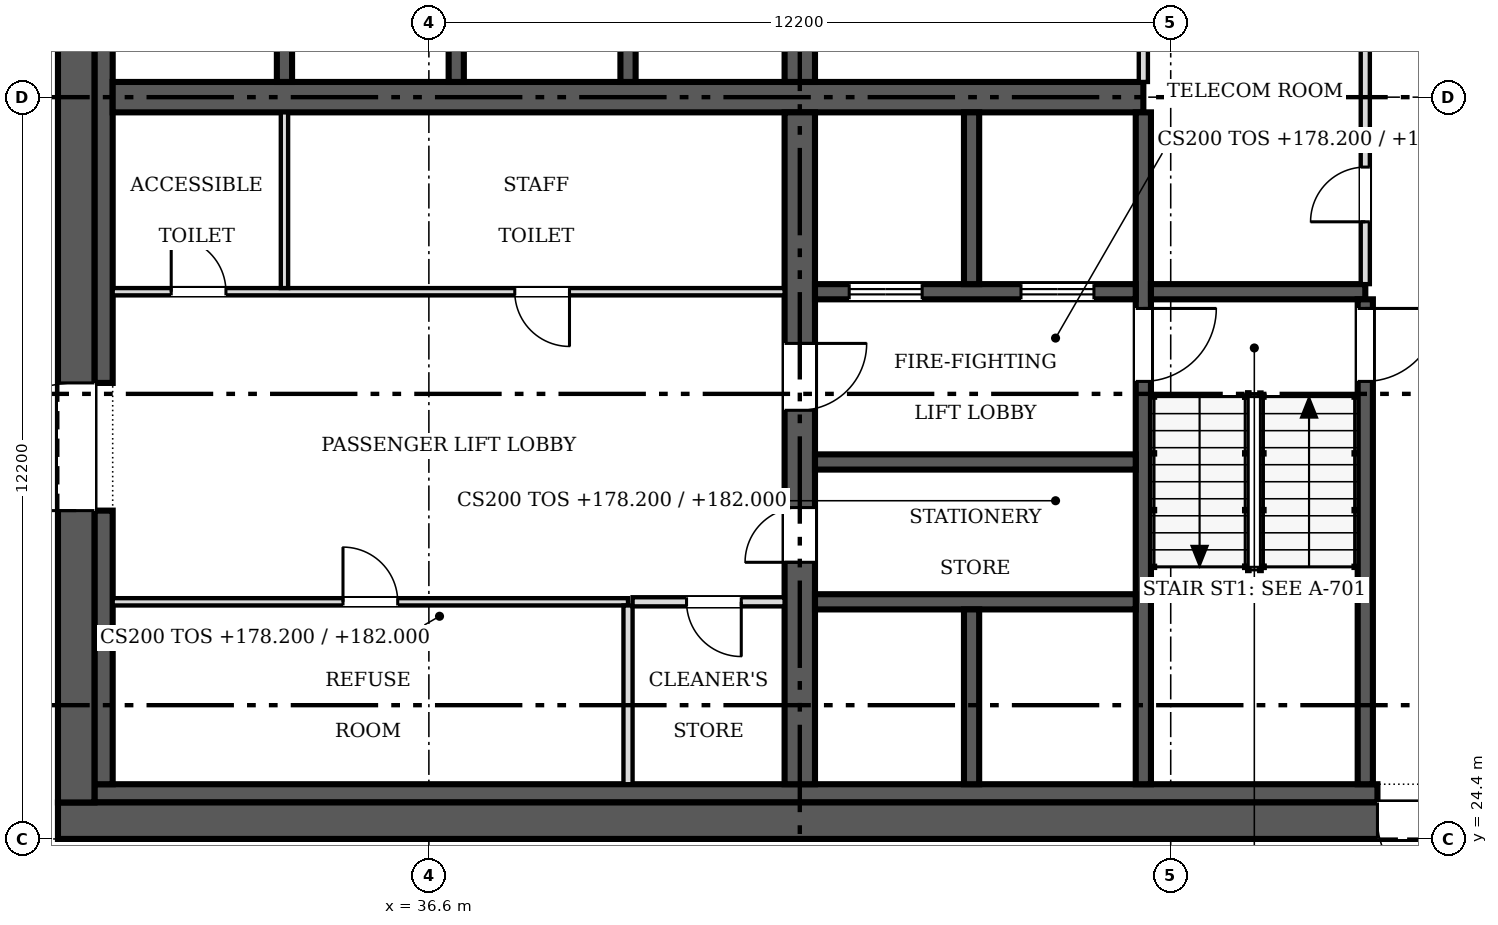
"""IFC4 building model, lengths in metres.
Left out: names, types, materials, properties, quantities, classifications, styles, units other than length and angle.
Written with IfcOpenShell. Run it as: python <this file> out.ifc"""

import sys

from ifc_helpers import new_model, si_unit, direction, frame, frame_2d, origin, place, context, subcontext, project, spatial, rectangle, extrude, source, transform, mapped, element, fill, save


model = new_model("IFC4")
c1 = context("Model", 3, precision=1e-05, world=origin(), true_north=direction((0.0, 1.0)))
c2 = subcontext(c1, "Body", "Model", "MODEL_VIEW")
j1 = project(units=[si_unit("LENGTHUNIT", "METRE"), si_unit("PLANEANGLEUNIT", "RADIAN")], contexts=[c1])
p1 = place(None, origin())
s1 = spatial("IfcSite", under=j1, at=p1, CompositionType="ELEMENT")
p2 = place(p1, origin())
s2 = spatial("IfcBuilding", under=s1, at=p2, CompositionType="ELEMENT")
p3 = place(p2, frame((0.0, 0.0, 178.2)))
s3 = spatial("IfcBuildingStorey", under=s2, at=p3, CompositionType="ELEMENT", Elevation=178.2)
p4 = place(p3, frame((54.9, 24.7, 0.0), z_axis=(0.0, 0.0, 1.0), x_axis=(-1.0, 0.0, 0.0)))
e1 = element("IfcWall", 1, at=p4, inside=s3, PredefinedType="SHEAR", context=c2, shape_type="SweptSolid", body=[
    extrude(rectangle(XDim=24.4, YDim=0.6, at=frame_2d((12.2, 0.0))), origin(), (0.0, 0.0, 1.0), 3.8),
])
m1 = source(origin(), c2, "Body", "SweptSolid", [
    extrude(rectangle(XDim=1.2, YDim=2.1, at=frame_2d((0.6, 1.05))), frame((0.0, 0.31, 0.0), z_axis=(0.0, -1.0, 0.0), x_axis=(1.0, 0.0, 0.0)), (0.0, 0.0, 1.0), 0.62),
])
p5 = place(p4, frame((1.5, 0.0, 0.0)))
e2 = element("IfcOpeningElement", 2, at=p5, cuts=e1, PredefinedType="OPENING", context=c2, shape_type="MappedRepresentation", body=[
    mapped(m1, transform((0.0, 0.0, 0.0), scale=1.0)),
])
p6 = place(p3, frame((30.8, 25.0, 0.0), z_axis=(0.0, 0.0, 1.0), x_axis=(0.0, 1.0, 0.0)))
e3 = element("IfcWall", 3, at=p6, inside=s3, PredefinedType="SHEAR", context=c2, shape_type="SweptSolid", body=[
    extrude(rectangle(XDim=23.2, YDim=0.6, at=frame_2d((11.6, 0.0))), origin(), (0.0, 0.0, 1.0), 3.8),
])
m2 = source(origin(), c2, "Body", "SweptSolid", [
    extrude(rectangle(XDim=2.1, YDim=2.4, at=frame_2d((1.05, 1.2))), frame((0.0, 0.31, 0.0), z_axis=(0.0, -1.0, 0.0), x_axis=(1.0, 0.0, 0.0)), (0.0, 0.0, 1.0), 0.62),
])
p7 = place(p6, frame((4.8, 0.0, 0.0)))
e4 = element("IfcOpeningElement", 4, at=p7, cuts=e3, PredefinedType="OPENING", context=c2, shape_type="MappedRepresentation", body=[
    mapped(m2, transform((0.0, 0.0, 0.0), scale=1.0)),
])
p8 = place(p6, frame((16.3, 0.0, 0.0)))
e5 = element("IfcOpeningElement", 5, at=p8, cuts=e3, PredefinedType="OPENING", context=c2, shape_type="MappedRepresentation", body=[
    mapped(m2, transform((0.0, 0.0, 0.0), scale=1.0)),
])
p9 = place(p3, frame((31.1, 25.15, 0.0), z_axis=(0.0, 0.0, 1.0), x_axis=(1.0, 0.0, 0.0)))
e6 = element("IfcWall", 6, at=p9, inside=s3, PredefinedType="SOLIDWALL", context=c2, shape_type="SweptSolid", body=[
    extrude(rectangle(XDim=21.1, YDim=0.3, at=frame_2d((10.55, 0.0))), origin(), (0.0, 0.0, 1.0), 3.8),
])
p10 = place(p3, frame((31.25, 25.3, 0.0), z_axis=(0.0, 0.0, 1.0), x_axis=(0.0, 1.0, 0.0)))
e7 = element("IfcWall", 7, at=p10, inside=s3, PredefinedType="SOLIDWALL", context=c2, shape_type="SweptSolid", body=[
    extrude(rectangle(XDim=4.5, YDim=0.3, at=frame_2d((2.25, 0.0))), origin(), (0.0, 0.0, 1.0), 3.8),
])
p11 = place(p3, frame((31.25, 31.9, 0.0), z_axis=(0.0, 0.0, 1.0), x_axis=(0.0, 1.0, 0.0)))
e8 = element("IfcWall", 8, at=p11, inside=s3, PredefinedType="SOLIDWALL", context=c2, shape_type="SweptSolid", body=[
    extrude(rectangle(XDim=9.4, YDim=0.3, at=frame_2d((4.7, 0.0))), origin(), (0.0, 0.0, 1.0), 3.8),
])
p12 = place(p3, frame((31.4, 36.6, 0.0), z_axis=(0.0, 0.0, 1.0), x_axis=(1.0, 0.0, 0.0)))
e9 = element("IfcWall", 9, at=p12, inside=s3, PredefinedType="SHEAR", context=c2, shape_type="SweptSolid", body=[
    extrude(rectangle(XDim=16.95, YDim=0.5, at=frame_2d((8.475, 0.0))), origin(), (0.0, 0.0, 1.0), 3.8),
])
p13 = place(p3, frame((42.7, 36.35, 0.0), z_axis=(0.0, 0.0, 1.0), x_axis=(0.0, -1.0, 0.0)))
e10 = element("IfcWall", 10, at=p13, inside=s3, PredefinedType="SHEAR", context=c2, shape_type="SweptSolid", body=[
    extrude(rectangle(XDim=11.05, YDim=0.5, at=frame_2d((5.525, 0.0))), origin(), (0.0, 0.0, 1.0), 3.8),
])
m3 = source(origin(), c2, "Body", "SweptSolid", [
    extrude(rectangle(XDim=0.9, YDim=2.1, at=frame_2d((0.45, 1.05))), frame((0.0, 0.26, 0.0), z_axis=(0.0, -1.0, 0.0), x_axis=(1.0, 0.0, 0.0)), (0.0, 0.0, 1.0), 0.52),
])
p14 = place(p13, frame((6.5, 0.0, 0.0)))
e11 = element("IfcOpeningElement", 11, at=p14, cuts=e10, PredefinedType="OPENING", context=c2, shape_type="MappedRepresentation", body=[
    mapped(m3, transform((0.0, 0.0, 0.0), scale=1.0)),
])
m4 = source(origin(), c2, "Body", "SweptSolid", [
    extrude(rectangle(XDim=1.1, YDim=2.1, at=frame_2d((0.55, 1.05))), frame((0.0, 0.26, 0.0), z_axis=(0.0, -1.0, 0.0), x_axis=(1.0, 0.0, 0.0)), (0.0, 0.0, 1.0), 0.52),
])
p15 = place(p13, frame((3.8, 0.0, 0.0)))
e12 = element("IfcOpeningElement", 12, at=p15, cuts=e10, PredefinedType="OPENING", context=c2, shape_type="MappedRepresentation", body=[
    mapped(m4, transform((0.0, 0.0, 0.0), scale=1.0)),
])
p16 = place(p3, frame((42.7, 36.85, 0.0), z_axis=(0.0, 0.0, 1.0), x_axis=(0.0, 1.0, 0.0)))
e13 = element("IfcWall", 13, at=p16, inside=s3, PredefinedType="SHEAR", context=c2, shape_type="SweptSolid", body=[
    extrude(rectangle(XDim=2.95, YDim=0.5, at=frame_2d((1.475, 0.0))), origin(), (0.0, 0.0, 1.0), 3.8),
])
p17 = place(p3, frame((48.35, 36.35, 0.0), z_axis=(0.0, 0.0, 1.0), x_axis=(0.0, -1.0, 0.0)))
e14 = element("IfcWall", 14, at=p17, inside=s3, PredefinedType="SOLIDWALL", context=c2, shape_type="SweptSolid", body=[
    extrude(rectangle(XDim=11.05, YDim=0.25, at=frame_2d((5.525, 0.0))), origin(), (0.0, 0.0, 1.0), 3.8),
])
m5 = source(origin(), c2, "Body", "SweptSolid", [
    extrude(rectangle(XDim=1.2, YDim=2.1, at=frame_2d((0.6, 1.05))), frame((0.0, 0.135, 0.0), z_axis=(0.0, -1.0, 0.0), x_axis=(1.0, 0.0, 0.0)), (0.0, 0.0, 1.0), 0.27),
])
p18 = place(p17, frame((3.225, 0.0, 0.0)))
e15 = element("IfcOpeningElement", 15, at=p18, cuts=e14, PredefinedType="OPENING", context=c2, shape_type="MappedRepresentation", body=[
    mapped(m5, transform((0.0, 0.0, 0.0), scale=1.0)),
])
p19 = place(p3, frame((48.225, 33.4, 0.0), z_axis=(0.0, 0.0, 1.0), x_axis=(-1.0, 0.0, 0.0)))
e16 = element("IfcWall", 16, at=p19, inside=s3, PredefinedType="SOLIDWALL", context=c2, shape_type="SweptSolid", body=[
    extrude(rectangle(XDim=5.275, YDim=0.25, at=frame_2d((2.638, 0.0))), origin(), (0.0, 0.0, 1.0), 3.8),
])
p20 = place(p19, frame((3.512, 0.0, 0.0)))
e17 = element("IfcOpeningElement", 17, at=p20, cuts=e16, PredefinedType="OPENING", context=c2, shape_type="MappedRepresentation", body=[
    mapped(m5, transform((0.0, 0.0, 0.0), scale=1.0)),
])
p21 = place(p19, frame((0.688, 0.0, 0.0)))
e18 = element("IfcOpeningElement", 18, at=p21, cuts=e16, PredefinedType="OPENING", context=c2, shape_type="MappedRepresentation", body=[
    mapped(m5, transform((0.0, 0.0, 0.0), scale=1.0)),
])
p22 = place(p3, frame((48.475, 33.4, 0.0), z_axis=(0.0, 0.0, 1.0), x_axis=(1.0, 0.0, 0.0)))
e19 = element("IfcWall", 19, at=p22, inside=s3, PredefinedType="SOLIDWALL", context=c2, shape_type="SweptSolid", body=[
    extrude(rectangle(XDim=3.525, YDim=0.25, at=frame_2d((1.762, 0.0))), origin(), (0.0, 0.0, 1.0), 3.8),
])
p23 = place(p3, frame((52.0, 25.3, 0.0), z_axis=(0.0, 0.0, 1.0), x_axis=(0.0, 1.0, 0.0)))
e20 = element("IfcWall", 20, at=p23, inside=s3, PredefinedType="SOLIDWALL", context=c2, shape_type="SweptSolid", body=[
    extrude(rectangle(XDim=7.975, YDim=0.25, at=frame_2d((3.987, 0.0))), origin(), (0.0, 0.0, 1.0), 3.8),
])
p24 = place(p23, frame((6.625, 0.0, 0.0)))
e21 = element("IfcOpeningElement", 21, at=p24, cuts=e20, PredefinedType="OPENING", context=c2, shape_type="MappedRepresentation", body=[
    mapped(m5, transform((0.0, 0.0, 0.0), scale=1.0)),
])
for number, where, z_axis, x_axis in (
    (22, (42.95, 28.3, 0.0), (0.0, 0.0, 1.0), (1.0, 0.0, 0.0)),
    (23, (42.95, 30.6, 0.0), (0.0, 0.0, 1.0), (1.0, 0.0, 0.0)),
):
    element("IfcWall", number, at=place(p3, frame(where, z_axis=z_axis, x_axis=x_axis)), inside=s3, PredefinedType="SOLIDWALL", context=c2, shape_type="SweptSolid", body=[
        extrude(rectangle(XDim=5.275, YDim=0.25, at=frame_2d((2.638, 0.0))), origin(), (0.0, 0.0, 1.0), 3.8),
    ])
for number, where, z_axis, x_axis in (
    (24, (34.225, 36.85, 0.0), (0.0, 0.0, 1.0), (0.0, 1.0, 0.0)),
    (25, (37.05, 36.85, 0.0), (0.0, 0.0, 1.0), (0.0, 1.0, 0.0)),
    (26, (39.875, 36.85, 0.0), (0.0, 0.0, 1.0), (0.0, 1.0, 0.0)),
):
    element("IfcWall", number, at=place(p3, frame(where, z_axis=z_axis, x_axis=x_axis)), inside=s3, PredefinedType="SOLIDWALL", context=c2, shape_type="SweptSolid", body=[
        extrude(rectangle(XDim=2.825, YDim=0.25, at=frame_2d((1.413, 0.0))), origin(), (0.0, 0.0, 1.0), 3.8),
    ])
p25 = place(p3, frame((45.525, 33.525, 0.0), z_axis=(0.0, 0.0, 1.0), x_axis=(0.0, 1.0, 0.0)))
e27 = element("IfcWall", 27, at=p25, inside=s3, PredefinedType="SOLIDWALL", context=c2, shape_type="SweptSolid", body=[
    extrude(rectangle(XDim=2.825, YDim=0.25, at=frame_2d((1.413, 0.0))), origin(), (0.0, 0.0, 1.0), 3.8),
])
p26 = place(p3, frame((45.525, 25.3, 0.0), z_axis=(0.0, 0.0, 1.0), x_axis=(0.0, 1.0, 0.0)))
e28 = element("IfcWall", 28, at=p26, inside=s3, PredefinedType="SOLIDWALL", context=c2, shape_type="SweptSolid", body=[
    extrude(rectangle(XDim=2.875, YDim=0.25, at=frame_2d((1.438, 0.0))), origin(), (0.0, 0.0, 1.0), 3.8),
])
p27 = place(p3, frame((31.4, 33.4, 0.0), z_axis=(0.0, 0.0, 1.0), x_axis=(1.0, 0.0, 0.0)))
e29 = element("IfcWall", 29, at=p27, inside=s3, PredefinedType="PARTITIONING", context=c2, shape_type="SweptSolid", body=[
    extrude(rectangle(XDim=11.05, YDim=0.12, at=frame_2d((5.525, 0.0))), origin(), (0.0, 0.0, 1.0), 3.6),
])
m6 = source(origin(), c2, "Body", "SweptSolid", [
    extrude(rectangle(XDim=0.9, YDim=2.1, at=frame_2d((0.45, 1.05))), frame((0.0, 0.07, 0.0), z_axis=(0.0, -1.0, 0.0), x_axis=(1.0, 0.0, 0.0)), (0.0, 0.0, 1.0), 0.14),
])
p28 = place(p27, frame((0.962, 0.0, 0.0)))
e30 = element("IfcOpeningElement", 30, at=p28, cuts=e29, PredefinedType="OPENING", context=c2, shape_type="MappedRepresentation", body=[
    mapped(m6, transform((0.0, 0.0, 0.0), scale=1.0)),
])
p29 = place(p27, frame((6.613, 0.0, 0.0)))
e31 = element("IfcOpeningElement", 31, at=p29, cuts=e29, PredefinedType="OPENING", context=c2, shape_type="MappedRepresentation", body=[
    mapped(m6, transform((0.0, 0.0, 0.0), scale=1.0)),
])
p30 = place(p3, frame((39.875, 28.3, 0.0), z_axis=(0.0, 0.0, 1.0), x_axis=(-1.0, 0.0, 0.0)))
e32 = element("IfcWall", 32, at=p30, inside=s3, PredefinedType="PARTITIONING", context=c2, shape_type="SweptSolid", body=[
    extrude(rectangle(XDim=8.475, YDim=0.12, at=frame_2d((4.238, 0.0))), origin(), (0.0, 0.0, 1.0), 3.6),
])
p31 = place(p30, frame((3.788, 0.0, 0.0)))
e33 = element("IfcOpeningElement", 33, at=p31, cuts=e32, PredefinedType="OPENING", context=c2, shape_type="MappedRepresentation", body=[
    mapped(m6, transform((0.0, 0.0, 0.0), scale=1.0)),
])
p32 = place(p3, frame((52.0, 33.525, 0.0), z_axis=(0.0, 0.0, 1.0), x_axis=(0.0, 1.0, 0.0)))
e34 = element("IfcWall", 34, at=p32, inside=s3, PredefinedType="PARTITIONING", context=c2, shape_type="SweptSolid", body=[
    extrude(rectangle(XDim=6.275, YDim=0.15, at=frame_2d((3.138, 0.0))), origin(), (0.0, 0.0, 1.0), 3.6),
])
m7 = source(origin(), c2, "Body", "SweptSolid", [
    extrude(rectangle(XDim=0.9, YDim=2.1, at=frame_2d((0.45, 1.05))), frame((0.0, 0.085, 0.0), z_axis=(0.0, -1.0, 0.0), x_axis=(1.0, 0.0, 0.0)), (0.0, 0.0, 1.0), 0.17),
])
p33 = place(p32, frame((1.025, 0.0, 0.0)))
e35 = element("IfcOpeningElement", 35, at=p33, cuts=e34, PredefinedType="OPENING", context=c2, shape_type="MappedRepresentation", body=[
    mapped(m7, transform((0.0, 0.0, 0.0), scale=1.0)),
])
p34 = place(p3, frame((48.35, 36.85, 0.0), z_axis=(0.0, 0.0, 1.0), x_axis=(0.0, 1.0, 0.0)))
e36 = element("IfcWall", 36, at=p34, inside=s3, PredefinedType="PARTITIONING", context=c2, shape_type="SweptSolid", body=[
    extrude(rectangle(XDim=2.95, YDim=0.15, at=frame_2d((1.475, 0.0))), origin(), (0.0, 0.0, 1.0), 3.6),
])
p35 = place(p3, frame((34.225, 33.46, 0.0), z_axis=(0.0, 0.0, 1.0), x_axis=(0.0, 1.0, 0.0)))
e37 = element("IfcWall", 37, at=p35, inside=s3, PredefinedType="PARTITIONING", context=c2, shape_type="SweptSolid", body=[
    extrude(rectangle(XDim=2.89, YDim=0.12, at=frame_2d((1.445, 0.0))), origin(), (0.0, 0.0, 1.0), 3.6),
])
p36 = place(p3, frame((39.875, 25.3, 0.0), z_axis=(0.0, 0.0, 1.0), x_axis=(0.0, 1.0, 0.0)))
e38 = element("IfcWall", 38, at=p36, inside=s3, PredefinedType="PARTITIONING", context=c2, shape_type="SweptSolid", body=[
    extrude(rectangle(XDim=2.94, YDim=0.15, at=frame_2d((1.47, 0.0))), origin(), (0.0, 0.0, 1.0), 3.6),
])
p37 = place(p3, frame((42.45, 28.3, 0.0), z_axis=(0.0, 0.0, 1.0), x_axis=(-1.0, 0.0, 0.0)))
e39 = element("IfcWall", 39, at=p37, inside=s3, PredefinedType="PARTITIONING", context=c2, shape_type="SweptSolid", body=[
    extrude(rectangle(XDim=2.5, YDim=0.15, at=frame_2d((1.25, 0.0))), origin(), (0.0, 0.0, 1.0), 3.6),
])
p38 = place(p37, frame((0.712, 0.0, 0.0)))
e40 = element("IfcOpeningElement", 40, at=p38, cuts=e39, PredefinedType="OPENING", context=c2, shape_type="MappedRepresentation", body=[
    mapped(m7, transform((0.0, 0.0, 0.0), scale=1.0)),
])
m8 = source(origin(), c2, "Body", "SweptSolid", [
    extrude(rectangle(XDim=1.2, YDim=2.1, at=frame_2d((0.6, 1.05))), frame((0.0, 0.025, 0.0), z_axis=(0.0, -1.0, 0.0), x_axis=(1.0, 0.0, 0.0)), (0.0, 0.0, 1.0), 0.05),
])
p39 = place(p5, origin())
e41 = element("IfcDoor", 41, at=p39, inside=s3, OperationType="SINGLE_SWING_LEFT", PredefinedType="DOOR", context=c2, shape_type="MappedRepresentation", body=[
    mapped(m8, transform((0.0, 0.0, 0.0), scale=1.0)),
])
fill(e2, e41)
m9 = source(origin(), c2, "Body", "SweptSolid", [
    extrude(rectangle(XDim=2.1, YDim=2.4, at=frame_2d((1.05, 1.2))), frame((0.0, 0.025, 0.0), z_axis=(0.0, -1.0, 0.0), x_axis=(1.0, 0.0, 0.0)), (0.0, 0.0, 1.0), 0.05),
])
p40 = place(p7, origin())
e42 = element("IfcDoor", 42, at=p40, inside=s3, OperationType="DOUBLE_DOOR_SINGLE_SWING", PredefinedType="DOOR", context=c2, shape_type="MappedRepresentation", body=[
    mapped(m9, transform((0.0, 0.0, 0.0), scale=1.0)),
])
fill(e4, e42)
m10 = source(origin(), c2, "Body", "SweptSolid", [
    extrude(rectangle(XDim=0.9, YDim=2.1, at=frame_2d((0.45, 1.05))), frame((0.0, 0.025, 0.0), z_axis=(0.0, -1.0, 0.0), x_axis=(1.0, 0.0, 0.0)), (0.0, 0.0, 1.0), 0.05),
])
p41 = place(p14, origin())
e43 = element("IfcDoor", 43, at=p41, inside=s3, OperationType="SINGLE_SWING_RIGHT", PredefinedType="DOOR", context=c2, shape_type="MappedRepresentation", body=[
    mapped(m10, transform((0.0, 0.0, 0.0), scale=1.0)),
])
fill(e11, e43)
m11 = source(origin(), c2, "Body", "SweptSolid", [
    extrude(rectangle(XDim=1.1, YDim=2.1, at=frame_2d((0.55, 1.05))), frame((0.0, 0.025, 0.0), z_axis=(0.0, -1.0, 0.0), x_axis=(1.0, 0.0, 0.0)), (0.0, 0.0, 1.0), 0.05),
])
p42 = place(p15, origin())
e44 = element("IfcDoor", 44, at=p42, inside=s3, OperationType="SINGLE_SWING_LEFT", PredefinedType="DOOR", context=c2, shape_type="MappedRepresentation", body=[
    mapped(m11, transform((0.0, 0.0, 0.0), scale=1.0)),
])
fill(e12, e44)
p43 = place(p18, origin())
e45 = element("IfcDoor", 45, at=p43, inside=s3, OperationType="SINGLE_SWING_LEFT", PredefinedType="DOOR", context=c2, shape_type="MappedRepresentation", body=[
    mapped(m8, transform((0.0, 0.0, 0.0), scale=1.0)),
])
fill(e15, e45)
p44 = place(p20, origin())
e46 = element("IfcDoor", 46, at=p44, inside=s3, OperationType="DOUBLE_DOOR_SLIDING", PredefinedType="DOOR", context=c2, shape_type="MappedRepresentation", body=[
    mapped(m8, transform((0.0, 0.0, 0.0), scale=1.0)),
])
fill(e17, e46)
p45 = place(p21, origin())
e47 = element("IfcDoor", 47, at=p45, inside=s3, OperationType="DOUBLE_DOOR_SLIDING", PredefinedType="DOOR", context=c2, shape_type="MappedRepresentation", body=[
    mapped(m8, transform((0.0, 0.0, 0.0), scale=1.0)),
])
fill(e18, e47)
p46 = place(p24, origin())
e48 = element("IfcDoor", 48, at=p46, inside=s3, OperationType="SINGLE_SWING_RIGHT", PredefinedType="DOOR", context=c2, shape_type="MappedRepresentation", body=[
    mapped(m8, transform((0.0, 0.0, 0.0), scale=1.0)),
])
fill(e21, e48)
p47 = place(p28, origin())
e49 = element("IfcDoor", 49, at=p47, inside=s3, OperationType="SINGLE_SWING_LEFT", PredefinedType="DOOR", context=c2, shape_type="MappedRepresentation", body=[
    mapped(m10, transform((0.0, 0.0, 0.0), scale=1.0)),
])
fill(e30, e49)
p48 = place(p29, origin())
e50 = element("IfcDoor", 50, at=p48, inside=s3, OperationType="SINGLE_SWING_RIGHT", PredefinedType="DOOR", context=c2, shape_type="MappedRepresentation", body=[
    mapped(m10, transform((0.0, 0.0, 0.0), scale=1.0)),
])
fill(e31, e50)
p49 = place(p31, origin())
e51 = element("IfcDoor", 51, at=p49, inside=s3, OperationType="SINGLE_SWING_RIGHT", PredefinedType="DOOR", context=c2, shape_type="MappedRepresentation", body=[
    mapped(m10, transform((0.0, 0.0, 0.0), scale=1.0)),
])
fill(e33, e51)
p50 = place(p33, origin())
e52 = element("IfcDoor", 52, at=p50, inside=s3, OperationType="SINGLE_SWING_LEFT", PredefinedType="DOOR", context=c2, shape_type="MappedRepresentation", body=[
    mapped(m10, transform((0.0, 0.0, 0.0), scale=1.0)),
])
fill(e35, e52)
p51 = place(p38, origin())
e53 = element("IfcDoor", 53, at=p51, inside=s3, OperationType="SINGLE_SWING_LEFT", PredefinedType="DOOR", context=c2, shape_type="MappedRepresentation", body=[
    mapped(m10, transform((0.0, 0.0, 0.0), scale=1.0)),
])
fill(e40, e53)
save(model, sys.argv[1])
